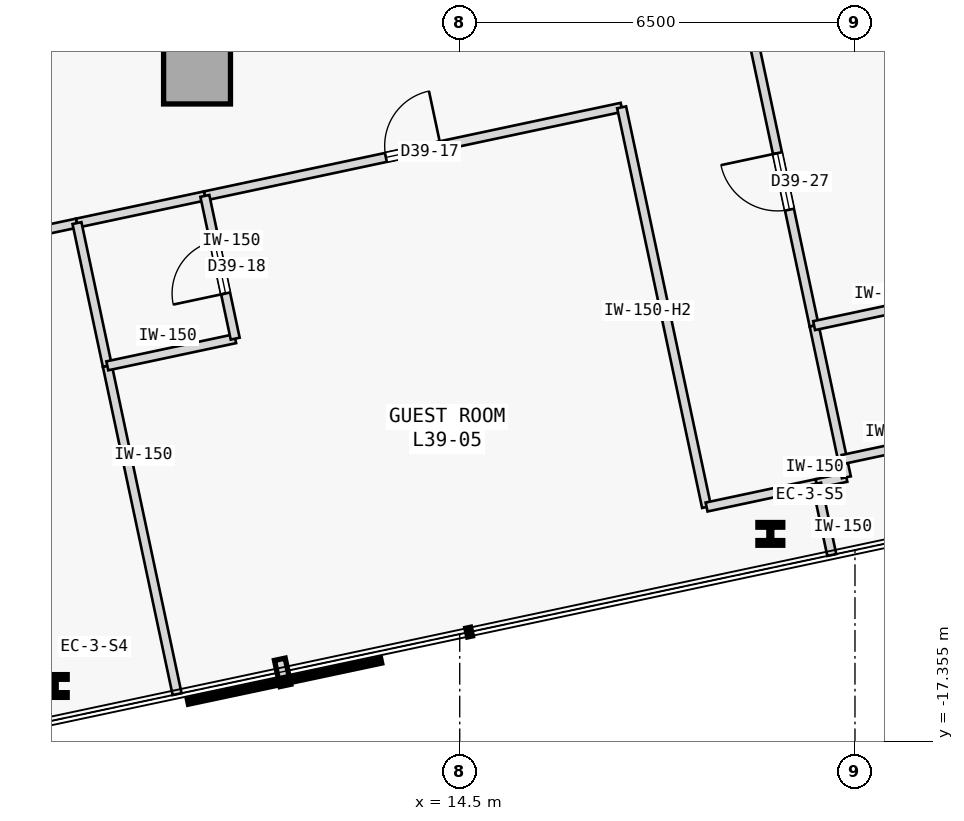
"""IFC4 building model, lengths in metres.
Left out: names, types, materials, properties, quantities, classifications, styles, units other than length and angle.
Written with IfcOpenShell. Run it as: python <this file> out.ifc"""

import sys

from ifc_helpers import new_model, si_unit, direction, frame, frame_2d, origin, origin_2d, place, context, subcontext, project, spatial, rectangle, i_section, extrude, element, fill, save


model = new_model("IFC4")
c1 = context("Model", 3, precision=1e-05, world=origin(), true_north=direction((0.0, 1.0)))
c2 = subcontext(c1, "Body", "Model", "MODEL_VIEW")
j1 = project(units=[si_unit("LENGTHUNIT", "METRE"), si_unit("PLANEANGLEUNIT", "RADIAN")], contexts=[c1])
p1 = place(None, origin())
s1 = spatial("IfcSite", under=j1, at=p1, CompositionType="ELEMENT")
p2 = place(p1, origin())
s2 = spatial("IfcBuilding", under=s1, at=p2, CompositionType="ELEMENT")
p3 = place(p2, frame((0.0, 0.0, 154.8)))
s3 = spatial("IfcBuildingStorey", under=s2, at=p3, CompositionType="ELEMENT", Elevation=154.8)
p4 = place(p3, frame((10.18, -6.32, 0.0), z_axis=(0.0, 0.0, 1.0), x_axis=(1.0, 0.0, 0.0)))
e1 = element("IfcColumn", 1, at=p4, inside=s3, PredefinedType="COLUMN", context=c2, shape_type="SweptSolid", body=[
    extrude(rectangle(XDim=1.1, YDim=1.1, at=origin_2d()), origin(), (0.0, 0.0, 1.0), 3.4),
])
for number, where, z_axis, x_axis in (
    (2, (7.84, -16.441, 0.0), (0.0, 0.0, 1.0), (1.0, 0.0, 0.0)),
    (3, (19.608, -13.94, 0.0), (0.0, 0.0, 1.0), (1.0, 0.0, 0.0)),
):
    element("IfcColumn", number, at=place(p3, frame(where, z_axis=z_axis, x_axis=x_axis)), inside=s3, PredefinedType="COLUMN", context=c2, shape_type="SweptSolid", body=[
        extrude(i_section(OverallWidth=0.409, OverallDepth=0.374, WebThickness=0.048, FlangeThickness=0.077, FilletRadius=0.015, at=origin_2d()), origin(), (0.0, 0.0, 1.0), 3.4),
    ])
p5 = place(p3, frame((-1.803, -10.957, 0.0), z_axis=(0.0, 0.0, 1.0), x_axis=(0.978145386425, 0.207922108048, 0.0)))
e4 = element("IfcWall", 4, at=p5, inside=s3, PredefinedType="PARTITIONING", context=c2, shape_type="SweptSolid", body=[
    extrude(rectangle(XDim=10.232, YDim=0.15, at=frame_2d((5.116, 0.0))), origin(), (0.0, 0.0, 1.0), 3.175),
])
p6 = place(p5, frame((4.656, 0.0, 0.0)))
e5 = element("IfcOpeningElement", 5, at=p6, cuts=e4, PredefinedType="OPENING", context=c2, shape_type="SweptSolid", body=[
    extrude(rectangle(XDim=0.92, YDim=2.15, at=frame_2d((0.46, 1.075))), frame((0.0, 0.085, 0.0), z_axis=(0.0, -1.0, 0.0), x_axis=(1.0, 0.0, 0.0)), (0.0, 0.0, 1.0), 0.17),
])
p7 = place(p3, frame((10.309, -8.382, 0.0), z_axis=(0.0, 0.0, 1.0), x_axis=(0.978149817889, 0.207901259648, 0.0)))
e6 = element("IfcWall", 6, at=p7, inside=s3, PredefinedType="PARTITIONING", context=c2, shape_type="SweptSolid", body=[
    extrude(rectangle(XDim=7.007, YDim=0.15, at=frame_2d((3.503, 0.0))), origin(), (0.0, 0.0, 1.0), 3.175),
])
p8 = place(p7, frame((3.043, 0.0, 0.0)))
e7 = element("IfcOpeningElement", 7, at=p8, cuts=e6, PredefinedType="OPENING", context=c2, shape_type="SweptSolid", body=[
    extrude(rectangle(XDim=0.92, YDim=2.15, at=frame_2d((0.46, 1.075))), frame((0.0, 0.085, 0.0), z_axis=(0.0, -1.0, 0.0), x_axis=(1.0, 0.0, 0.0)), (0.0, 0.0, 1.0), 0.17),
])
p9 = place(p3, frame((18.56, -13.498, 0.0), z_axis=(0.0, 0.0, 1.0), x_axis=(-0.207888737749, 0.978152479278, 0.0)))
e8 = element("IfcWall", 8, at=p9, inside=s3, PredefinedType="PARTITIONING", context=c2, shape_type="SweptSolid", body=[
    extrude(rectangle(XDim=6.72, YDim=0.15, at=frame_2d((3.36, 0.0))), origin(), (0.0, 0.0, 1.0), 2.575),
])
p10 = place(p3, frame((18.56, -13.498, 0.0), z_axis=(0.0, 0.0, 1.0), x_axis=(0.978160192495, 0.207852442415, 0.0)))
e9 = element("IfcWall", 9, at=p10, inside=s3, PredefinedType="PARTITIONING", context=c2, shape_type="SweptSolid", body=[
    extrude(rectangle(XDim=1.85, YDim=0.15, at=frame_2d((0.925, 0.0))), origin(), (0.0, 0.0, 1.0), 3.175),
])
p11 = place(p3, frame((8.206, -8.829, 0.0), z_axis=(0.0, 0.0, 1.0), x_axis=(0.978146728319, 0.207915795165, 0.0)))
e10 = element("IfcWall", 10, at=p11, inside=s3, PredefinedType="PARTITIONING", context=c2, shape_type="SweptSolid", body=[
    extrude(rectangle(XDim=2.15, YDim=0.15, at=frame_2d((1.075, 0.0))), origin(), (0.0, 0.0, 1.0), 3.175),
])
p12 = place(p3, frame((20.369, -13.114, 0.0), z_axis=(0.0, 0.0, 1.0), x_axis=(0.978143962546, 0.207928806409, 0.0)))
e11 = element("IfcWall", 11, at=p12, inside=s3, PredefinedType="PARTITIONING", context=c2, shape_type="SweptSolid", body=[
    extrude(rectangle(XDim=0.5, YDim=0.15, at=frame_2d((0.25, 0.0))), origin(), (0.0, 0.0, 1.0), 3.175),
])
p13 = place(p3, frame((20.858, -13.01, 0.0), z_axis=(0.0, 0.0, 1.0), x_axis=(-0.208306395052, 0.978063620518, 0.0)))
e12 = element("IfcWall", 12, at=p13, inside=s3, PredefinedType="PARTITIONING", context=c2, shape_type="SweptSolid", body=[
    extrude(rectangle(XDim=0.3, YDim=0.15, at=frame_2d((0.15, 0.0))), origin(), (0.0, 0.0, 1.0), 3.175),
])
p14 = place(p3, frame((20.328, -10.515, 0.0), z_axis=(0.0, 0.0, 1.0), x_axis=(-0.207950868925, 0.97813927235, 0.0)))
e13 = element("IfcWall", 13, at=p14, inside=s3, PredefinedType="PARTITIONING", context=c2, shape_type="SweptSolid", body=[
    extrude(rectangle(XDim=4.85, YDim=0.15, at=frame_2d((2.425, 0.0))), origin(), (0.0, 0.0, 1.0), 3.175),
])
p15 = place(p14, frame((1.95, 0.0, 0.0)))
e14 = element("IfcOpeningElement", 14, at=p15, cuts=e13, PredefinedType="OPENING", context=c2, shape_type="SweptSolid", body=[
    extrude(rectangle(XDim=0.95, YDim=2.15, at=frame_2d((0.475, 1.075))), frame((0.0, 0.085, 0.0), z_axis=(0.0, -1.0, 0.0), x_axis=(1.0, 0.0, 0.0)), (0.0, 0.0, 1.0), 0.17),
])
p16 = place(p3, frame((20.796, -12.716, 0.0), z_axis=(0.0, 0.0, 1.0), x_axis=(-0.207891197838, 0.978151956427, 0.0)))
e15 = element("IfcWall", 15, at=p16, inside=s3, PredefinedType="PARTITIONING", context=c2, shape_type="SweptSolid", body=[
    extrude(rectangle(XDim=2.25, YDim=0.15, at=frame_2d((1.125, 0.0))), origin(), (0.0, 0.0, 1.0), 3.175),
])
p17 = place(p3, frame((9.852, -16.576, 0.0), z_axis=(0.0, 0.0, 1.0), x_axis=(-0.20792487872, 0.978144797466, 0.0)))
e16 = element("IfcWall", 16, at=p17, inside=s3, PredefinedType="PARTITIONING", context=c2, shape_type="SweptSolid", body=[
    extrude(rectangle(XDim=5.52, YDim=0.15, at=frame_2d((2.76, 0.0))), origin(), (0.0, 0.0, 1.0), 3.175),
])
p18 = place(p3, frame((8.705, -11.177, 0.0), z_axis=(0.0, 0.0, 1.0), x_axis=(-0.207917150959, 0.978146440129, 0.0)))
e17 = element("IfcWall", 17, at=p18, inside=s3, PredefinedType="PARTITIONING", context=c2, shape_type="SweptSolid", body=[
    extrude(rectangle(XDim=2.4, YDim=0.15, at=frame_2d((1.2, 0.0))), origin(), (0.0, 0.0, 1.0), 3.175),
])
p19 = place(p3, frame((8.705, -11.177, 0.0), z_axis=(0.0, 0.0, 1.0), x_axis=(0.978123629285, 0.208024435669, 0.0)))
e18 = element("IfcWall", 18, at=p19, inside=s3, PredefinedType="PARTITIONING", context=c2, shape_type="SweptSolid", body=[
    extrude(rectangle(XDim=2.15, YDim=0.15, at=frame_2d((1.075, 0.0))), origin(), (0.0, 0.0, 1.0), 3.175),
])
p20 = place(p3, frame((10.808, -10.729, 0.0), z_axis=(0.0, 0.0, 1.0), x_axis=(-0.207937840262, 0.978142042133, 0.0)))
e19 = element("IfcWall", 19, at=p20, inside=s3, PredefinedType="PARTITIONING", context=c2, shape_type="SweptSolid", body=[
    extrude(rectangle(XDim=2.4, YDim=0.15, at=frame_2d((1.2, 0.0))), origin(), (0.0, 0.0, 1.0), 3.175),
])
p21 = place(p20, frame((0.76, 0.0, 0.0)))
e20 = element("IfcOpeningElement", 20, at=p21, cuts=e19, PredefinedType="OPENING", context=c2, shape_type="SweptSolid", body=[
    extrude(rectangle(XDim=0.88, YDim=2.15, at=frame_2d((0.44, 1.075))), frame((0.0, 0.085, 0.0), z_axis=(0.0, -1.0, 0.0), x_axis=(1.0, 0.0, 0.0)), (0.0, 0.0, 1.0), 0.17),
])
p22 = place(p3, frame((20.619, -14.288, 0.0), z_axis=(0.0, 0.0, 1.0), x_axis=(-0.207917150959, 0.978146440129, 0.0)))
e21 = element("IfcWall", 21, at=p22, inside=s3, PredefinedType="PARTITIONING", context=c2, shape_type="SweptSolid", body=[
    extrude(rectangle(XDim=1.2, YDim=0.15, at=frame_2d((0.6, 0.0))), origin(), (0.0, 0.0, 1.0), 3.175),
])
for number, where, z_axis, x_axis in (
    (22, (20.796, -12.716, 0.0), (0.0, 0.0, 1.0), (0.978, 0.208, 0.0)),
    (23, (20.328, -10.515, 0.0), (0.0, 0.0, 1.0), (0.978, 0.208, 0.0)),
):
    element("IfcWall", number, at=place(p3, frame(where, z_axis=z_axis, x_axis=x_axis)), inside=s3, PredefinedType="PARTITIONING", context=c2, shape_type="SweptSolid", body=[
        extrude(rectangle(XDim=1.85, YDim=0.15, at=frame_2d((0.925, 0.0))), origin(), (0.0, 0.0, 1.0), 3.175),
    ])
p23 = place(p8, origin())
e24 = element("IfcDoor", 24, at=p23, inside=s3, OperationType="SINGLE_SWING_RIGHT", PredefinedType="DOOR", context=c2, shape_type="SweptSolid", body=[
    extrude(rectangle(XDim=0.92, YDim=2.15, at=frame_2d((0.46, 1.075))), frame((0.0, 0.025, 0.0), z_axis=(0.0, -1.0, 0.0), x_axis=(1.0, 0.0, 0.0)), (0.0, 0.0, 1.0), 0.05),
])
fill(e7, e24)
p24 = place(p21, origin())
e25 = element("IfcDoor", 25, at=p24, inside=s3, OperationType="SINGLE_SWING_LEFT", PredefinedType="DOOR", context=c2, shape_type="SweptSolid", body=[
    extrude(rectangle(XDim=0.88, YDim=2.15, at=frame_2d((0.44, 1.075))), frame((0.0, 0.025, 0.0), z_axis=(0.0, -1.0, 0.0), x_axis=(1.0, 0.0, 0.0)), (0.0, 0.0, 1.0), 0.05),
])
fill(e20, e25)
p25 = place(p15, origin())
e26 = element("IfcDoor", 26, at=p25, inside=s3, OperationType="SINGLE_SWING_RIGHT", PredefinedType="DOOR", context=c2, shape_type="SweptSolid", body=[
    extrude(rectangle(XDim=0.95, YDim=2.15, at=frame_2d((0.475, 1.075))), frame((0.0, 0.025, 0.0), z_axis=(0.0, -1.0, 0.0), x_axis=(1.0, 0.0, 0.0)), (0.0, 0.0, 1.0), 0.05),
])
fill(e14, e26)
save(model, sys.argv[1])
